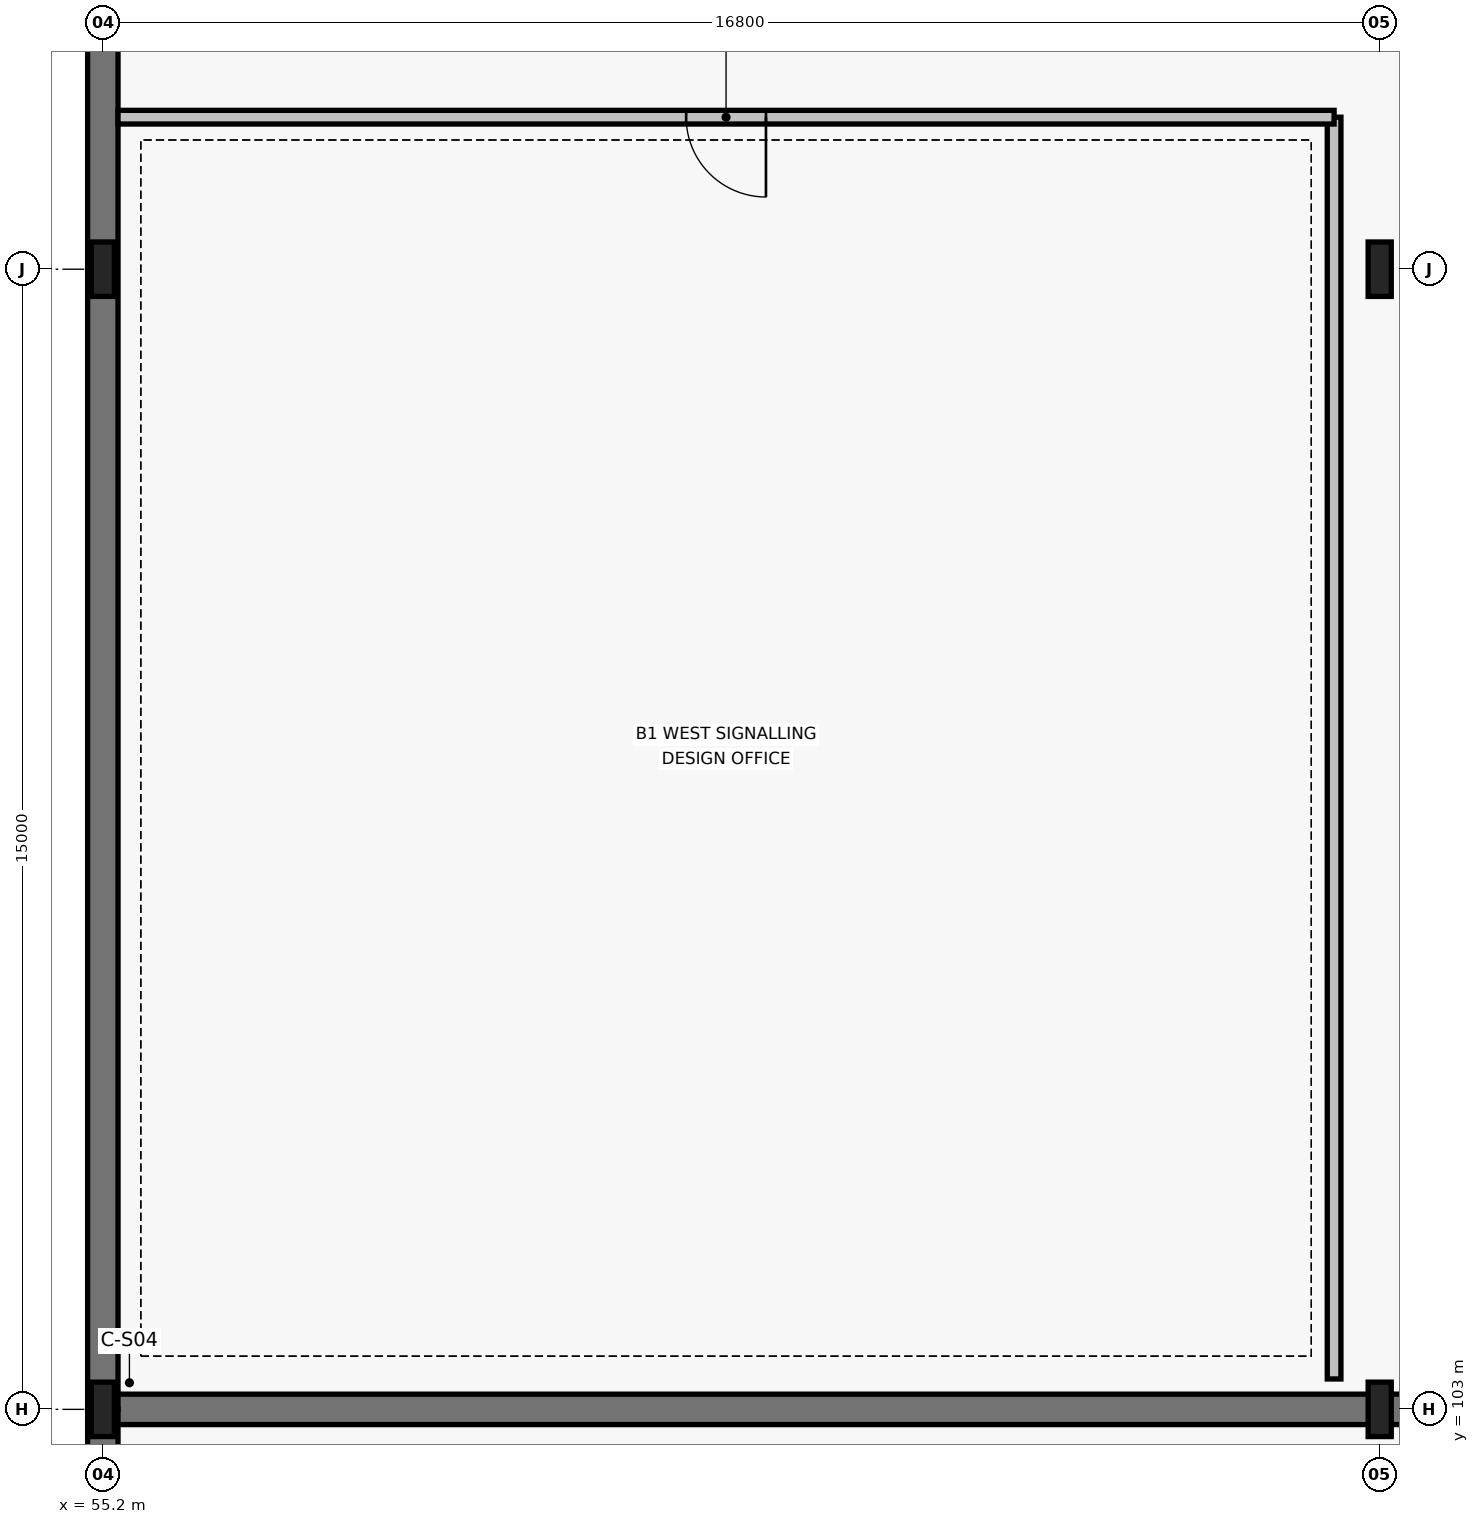
"""IFC4 building model, lengths in metres.
Left out: names, types, materials, properties, quantities, classifications, styles, units other than length and angle.
Written with IfcOpenShell. Run it as: python <this file> out.ifc"""

import sys

from ifc_helpers import new_model, si_unit, direction, frame, frame_2d, origin, origin_2d, place, context, subcontext, project, spatial, rectangle, i_section, extrude, element, fill, save


model = new_model("IFC4")
c1 = context("Model", 3, precision=1e-05, world=origin(), true_north=direction((0.0, 1.0)))
c2 = subcontext(c1, "Body", "Model", "MODEL_VIEW")
j1 = project(units=[si_unit("LENGTHUNIT", "METRE"), si_unit("PLANEANGLEUNIT", "RADIAN")], contexts=[c1])
p1 = place(None, origin())
s1 = spatial("IfcSite", under=j1, at=p1, CompositionType="ELEMENT")
p2 = place(p1, origin())
s2 = spatial("IfcBuilding", under=s1, at=p2, CompositionType="ELEMENT")
p3 = place(p2, frame((0.0, 0.0, -6.0)))
s3 = spatial("IfcBuildingStorey", under=s2, at=p3, CompositionType="ELEMENT", Elevation=-6.0)
for number, where, z_axis, x_axis in (
    (1, (55.2, 103.0, 0.0), (0.0, 0.0, 1.0), (1.0, 0.0, 0.0)),
    (2, (55.2, 118.0, 0.0), (0.0, 0.0, 1.0), (1.0, 0.0, 0.0)),
    (3, (72.0, 103.0, 0.0), (0.0, 0.0, 1.0), (1.0, 0.0, 0.0)),
    (4, (72.0, 118.0, 0.0), (0.0, 0.0, 1.0), (1.0, 0.0, 0.0)),
):
    element("IfcColumn", number, at=place(p3, frame(where, z_axis=z_axis, x_axis=x_axis)), inside=s3, PredefinedType="COLUMN", context=c2, shape_type="SweptSolid", body=[
        extrude(i_section(OverallWidth=0.304, OverallDepth=0.716, WebThickness=0.021, FlangeThickness=0.04, FilletRadius=0.027, at=origin_2d()), origin(), (0.0, 0.0, 1.0), 6.0),
    ])
p4 = place(p3, frame((55.2, 103.0, 0.0), z_axis=(0.0, 0.0, 1.0), x_axis=(1.0, 0.0, 0.0)))
e5 = element("IfcWall", 5, at=p4, inside=s3, PredefinedType="SOLIDWALL", context=c2, shape_type="SweptSolid", body=[
    extrude(rectangle(XDim=33.6, YDim=0.4, at=frame_2d((16.8, 0.0))), origin(), (0.0, 0.0, 1.0), 6.0),
])
p5 = place(p3, frame((55.2, 133.0, 0.0), z_axis=(0.0, 0.0, 1.0), x_axis=(0.0, -1.0, 0.0)))
e6 = element("IfcWall", 6, at=p5, inside=s3, PredefinedType="SOLIDWALL", context=c2, shape_type="SweptSolid", body=[
    extrude(rectangle(XDim=30.0, YDim=0.4, at=frame_2d((15.0, 0.0))), origin(), (0.0, 0.0, 1.0), 6.0),
])
p6 = place(p3, frame((55.2, 91.0, 0.0), z_axis=(0.0, 0.0, 1.0), x_axis=(0.0, 1.0, 0.0)))
e7 = element("IfcWall", 7, at=p6, inside=s3, PredefinedType="SOLIDWALL", context=c2, shape_type="SweptSolid", body=[
    extrude(rectangle(XDim=12.0, YDim=0.4, at=frame_2d((6.0, 0.0))), origin(), (0.0, 0.0, 1.0), 6.0),
])
p7 = place(p3, frame((71.4, 103.4, 0.0), z_axis=(0.0, 0.0, 1.0), x_axis=(0.0, 1.0, 0.0)))
e8 = element("IfcWall", 8, at=p7, inside=s3, PredefinedType="PARTITIONING", context=c2, shape_type="SweptSolid", body=[
    extrude(rectangle(XDim=16.6, YDim=0.18, at=frame_2d((8.3, 0.0))), origin(), (0.0, 0.0, 1.0), 5.255),
])
p8 = place(p3, frame((71.4, 120.0, 0.0), z_axis=(0.0, 0.0, 1.0), x_axis=(-1.0, 0.0, 0.0)))
e9 = element("IfcWall", 9, at=p8, inside=s3, PredefinedType="PARTITIONING", context=c2, shape_type="SweptSolid", body=[
    extrude(rectangle(XDim=16.0, YDim=0.18, at=frame_2d((8.0, 0.0))), origin(), (0.0, 0.0, 1.0), 5.75),
])
p9 = place(p8, frame((7.475, 0.0, 0.0)))
e10 = element("IfcOpeningElement", 10, at=p9, cuts=e9, PredefinedType="OPENING", context=c2, shape_type="SweptSolid", body=[
    extrude(rectangle(XDim=1.05, YDim=2.15, at=frame_2d((0.525, 1.075))), frame((0.0, 0.1, 0.0), z_axis=(0.0, -1.0, 0.0), x_axis=(1.0, 0.0, 0.0)), (0.0, 0.0, 1.0), 0.2),
])
p10 = place(p9, origin())
e11 = element("IfcDoor", 11, at=p10, inside=s3, OperationType="SINGLE_SWING_LEFT", PredefinedType="DOOR", context=c2, shape_type="SweptSolid", body=[
    extrude(rectangle(XDim=1.05, YDim=2.15, at=frame_2d((0.525, 1.075))), frame((0.0, 0.025, 0.0), z_axis=(0.0, -1.0, 0.0), x_axis=(1.0, 0.0, 0.0)), (0.0, 0.0, 1.0), 0.05),
])
fill(e10, e11)
save(model, sys.argv[1])
